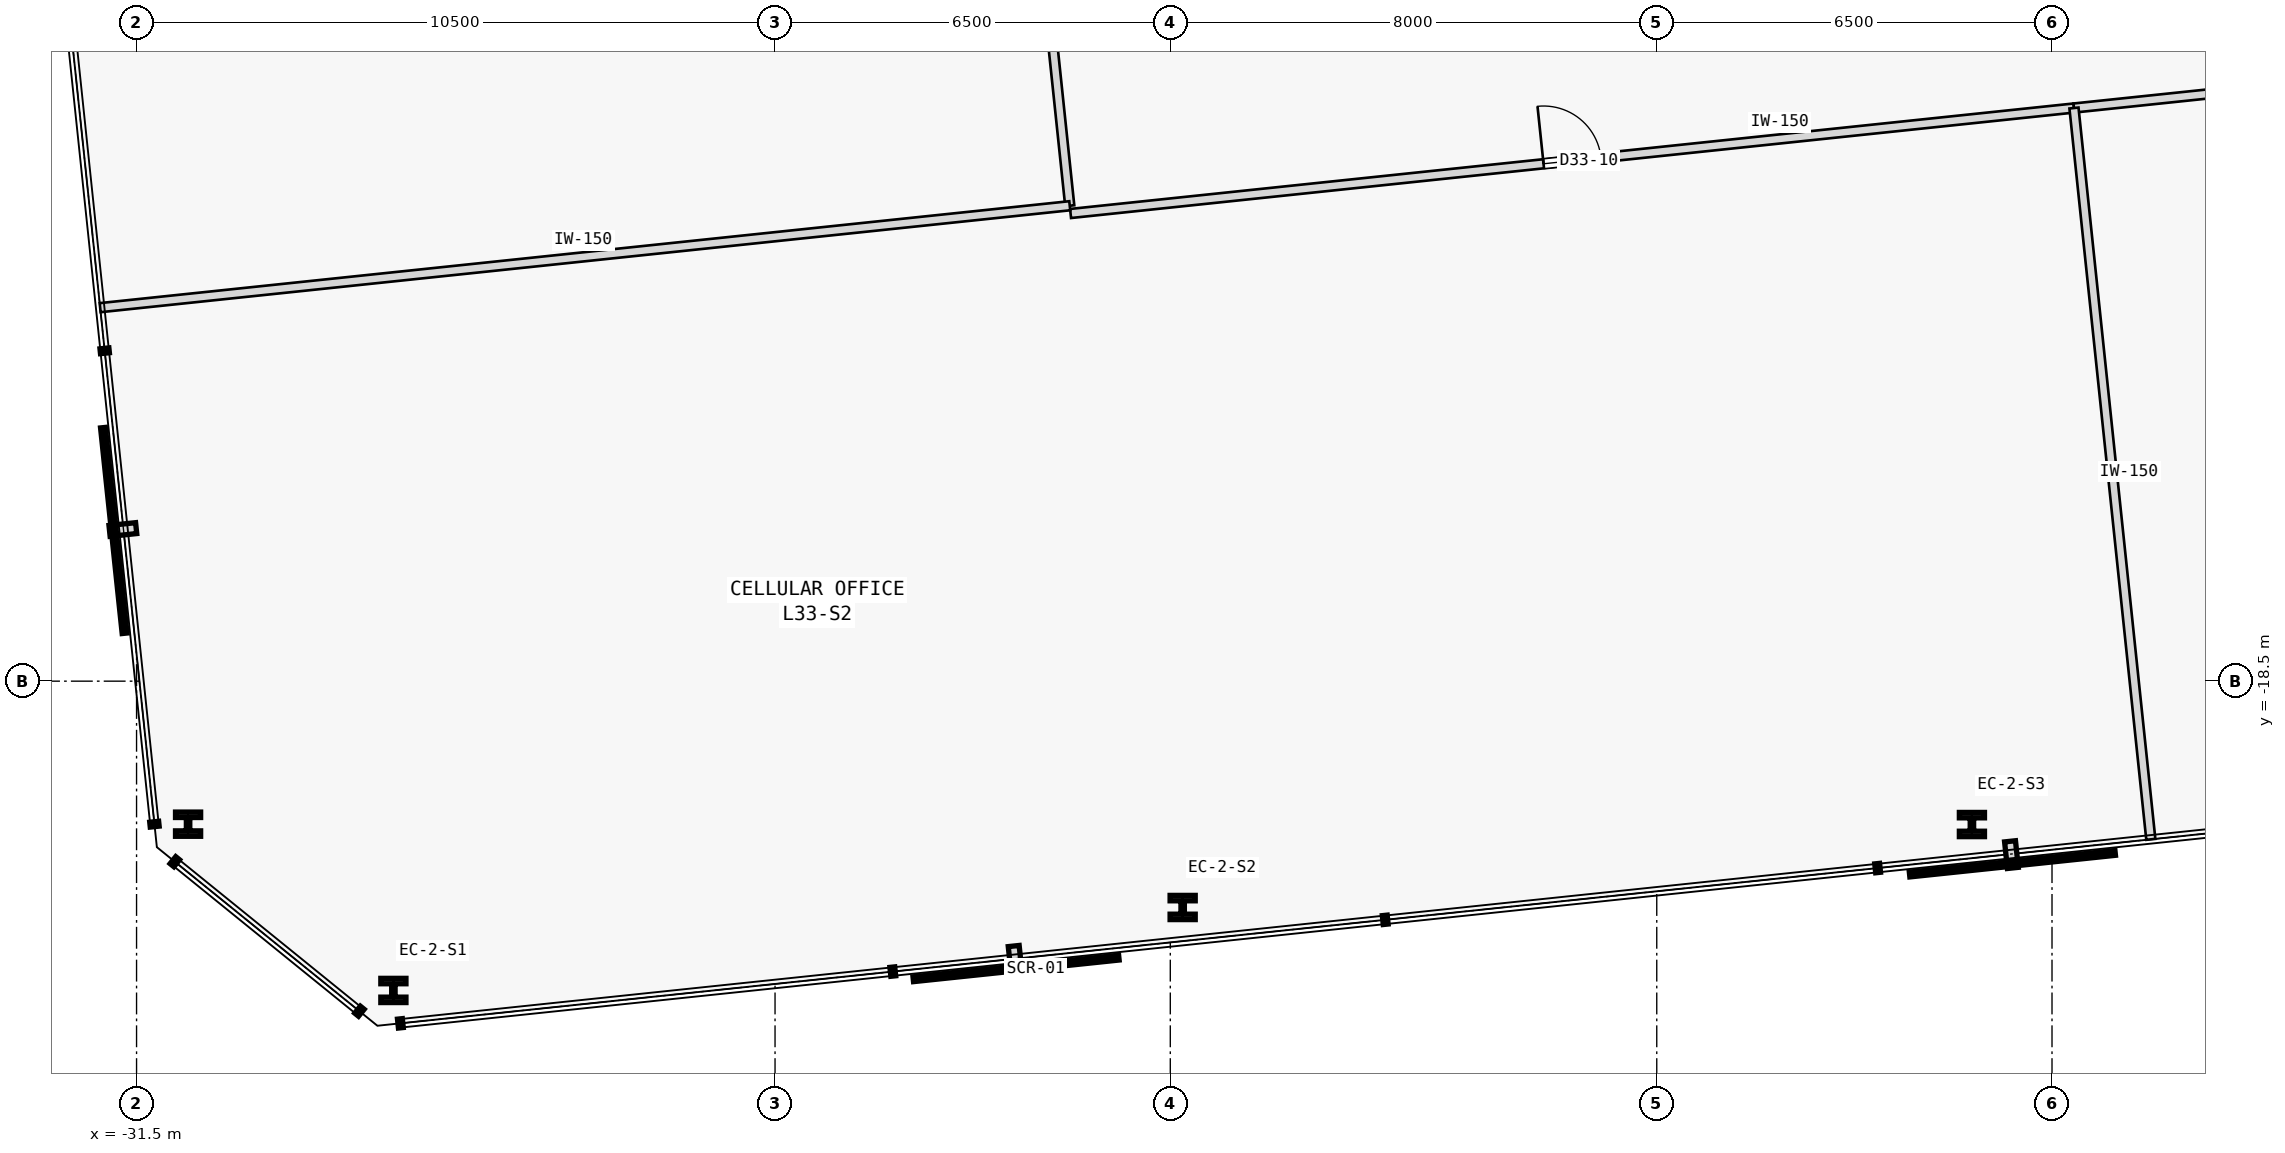
"""IFC4 building model, lengths in metres.
Left out: names, types, materials, properties, quantities, classifications, styles, units other than length and angle.
Written with IfcOpenShell. Run it as: python <this file> out.ifc"""

import sys

from ifc_helpers import new_model, si_unit, direction, frame, frame_2d, origin, origin_2d, place, context, subcontext, project, spatial, rectangle, i_section, extrude, element, fill, save


model = new_model("IFC4")
c1 = context("Model", 3, precision=1e-05, world=origin(), true_north=direction((0.0, 1.0)))
c2 = subcontext(c1, "Body", "Model", "MODEL_VIEW")
j1 = project(units=[si_unit("LENGTHUNIT", "METRE"), si_unit("PLANEANGLEUNIT", "RADIAN")], contexts=[c1])
p1 = place(None, origin())
s1 = spatial("IfcSite", under=j1, at=p1, CompositionType="ELEMENT")
p2 = place(p1, origin())
s2 = spatial("IfcBuilding", under=s1, at=p2, CompositionType="ELEMENT")
p3 = place(p2, frame((0.0, 0.0, 131.8)))
s3 = spatial("IfcBuildingStorey", under=s2, at=p3, CompositionType="ELEMENT", Elevation=131.8)
for number, where, z_axis, x_axis in (
    (1, (-27.276, -23.586, 0.0), (0.0, 0.0, 1.0), (1.0, 0.0, 0.0)),
    (2, (-14.297, -22.222, 0.0), (0.0, 0.0, 1.0), (1.0, 0.0, 0.0)),
    (3, (-1.317, -20.858, 0.0), (0.0, 0.0, 1.0), (1.0, 0.0, 0.0)),
    (4, (-30.653, -20.852, 0.0), (0.0, 0.0, 1.0), (1.0, 0.0, 0.0)),
):
    element("IfcColumn", number, at=place(p3, frame(where, z_axis=z_axis, x_axis=x_axis)), inside=s3, PredefinedType="COLUMN", context=c2, shape_type="SweptSolid", body=[
        extrude(i_section(OverallWidth=0.413, OverallDepth=0.398, WebThickness=0.056, FlangeThickness=0.089, FilletRadius=0.015, at=origin_2d()), origin(), (0.0, 0.0, 1.0), 3.7),
    ])
p4 = place(p3, frame((-16.14, -10.809, 0.0), z_axis=(0.0, 0.0, 1.0), x_axis=(0.994521566569, 0.104531591539, 0.0)))
e5 = element("IfcWall", 5, at=p4, inside=s3, PredefinedType="PARTITIONING", context=c2, shape_type="SweptSolid", body=[
    extrude(rectangle(XDim=16.592, YDim=0.15, at=frame_2d((8.296, 0.0))), origin(), (0.0, 0.0, 1.0), 3.475),
])
p5 = place(p4, frame((7.821, 0.0, 0.0)))
e6 = element("IfcOpeningElement", 6, at=p5, cuts=e5, PredefinedType="OPENING", context=c2, shape_type="SweptSolid", body=[
    extrude(rectangle(XDim=0.95, YDim=2.15, at=frame_2d((0.475, 1.075))), frame((0.0, 0.085, 0.0), z_axis=(0.0, -1.0, 0.0), x_axis=(1.0, 0.0, 0.0)), (0.0, 0.0, 1.0), 0.17),
])
p6 = place(p3, frame((0.361, -9.075, 0.0), z_axis=(0.0, 0.0, 1.0), x_axis=(0.994523293042, 0.104515164432, 0.0)))
e7 = element("IfcWall", 7, at=p6, inside=s3, PredefinedType="PARTITIONING", context=c2, shape_type="SweptSolid", body=[
    extrude(rectangle(XDim=17.982, YDim=0.15, at=frame_2d((8.991, 0.0))), origin(), (0.0, 0.0, 1.0), 3.475),
])
p7 = place(p6, frame((5.819, 0.0, 0.0)))
e8 = element("IfcOpeningElement", 8, at=p7, cuts=e7, PredefinedType="OPENING", context=c2, shape_type="SweptSolid", body=[
    extrude(rectangle(XDim=0.95, YDim=2.15, at=frame_2d((0.475, 1.075))), frame((0.0, 0.085, 0.0), z_axis=(0.0, -1.0, 0.0), x_axis=(1.0, 0.0, 0.0)), (0.0, 0.0, 1.0), 0.17),
])
p8 = place(p3, frame((-16.153, -10.682, 0.0), z_axis=(0.0, 0.0, 1.0), x_axis=(-0.104527614588, 0.994521984568, 0.0)))
e9 = element("IfcWall", 9, at=p8, inside=s3, PredefinedType="PARTITIONING", context=c2, shape_type="SweptSolid", body=[
    extrude(rectangle(XDim=17.87, YDim=0.15, at=frame_2d((8.935, 0.0))), origin(), (0.0, 0.0, 1.0), 3.475),
])
p9 = place(p8, frame((8.46, 0.0, 0.0)))
e10 = element("IfcOpeningElement", 10, at=p9, cuts=e9, PredefinedType="OPENING", context=c2, shape_type="SweptSolid", body=[
    extrude(rectangle(XDim=0.95, YDim=2.15, at=frame_2d((0.475, 1.075))), frame((0.0, 0.085, 0.0), z_axis=(0.0, -1.0, 0.0), x_axis=(1.0, 0.0, 0.0)), (0.0, 0.0, 1.0), 0.17),
])
p10 = place(p3, frame((1.625, -21.102, 0.0), z_axis=(0.0, 0.0, 1.0), x_axis=(-0.104515587229, 0.99452324861, 0.0)))
e11 = element("IfcWall", 11, at=p10, inside=s3, PredefinedType="PARTITIONING", context=c2, shape_type="SweptSolid", body=[
    extrude(rectangle(XDim=12.093, YDim=0.15, at=frame_2d((6.046, 0.0))), origin(), (0.0, 0.0, 1.0), 3.475),
])
p11 = place(p3, frame((-32.099, -12.358, 0.0), z_axis=(0.0, 0.0, 1.0), x_axis=(0.994522794159, 0.104519911488, 0.0)))
e12 = element("IfcWall", 12, at=p11, inside=s3, PredefinedType="PARTITIONING", context=c2, shape_type="SweptSolid", body=[
    extrude(rectangle(XDim=16.033, YDim=0.15, at=frame_2d((8.017, 0.0))), origin(), (0.0, 0.0, 1.0), 3.475),
])
p12 = place(p5, origin())
e13 = element("IfcDoor", 13, at=p12, inside=s3, OperationType="SINGLE_SWING_LEFT", PredefinedType="DOOR", context=c2, shape_type="SweptSolid", body=[
    extrude(rectangle(XDim=0.95, YDim=2.15, at=frame_2d((0.475, 1.075))), frame((0.0, 0.025, 0.0), z_axis=(0.0, -1.0, 0.0), x_axis=(1.0, 0.0, 0.0)), (0.0, 0.0, 1.0), 0.05),
])
fill(e6, e13)
save(model, sys.argv[1])
